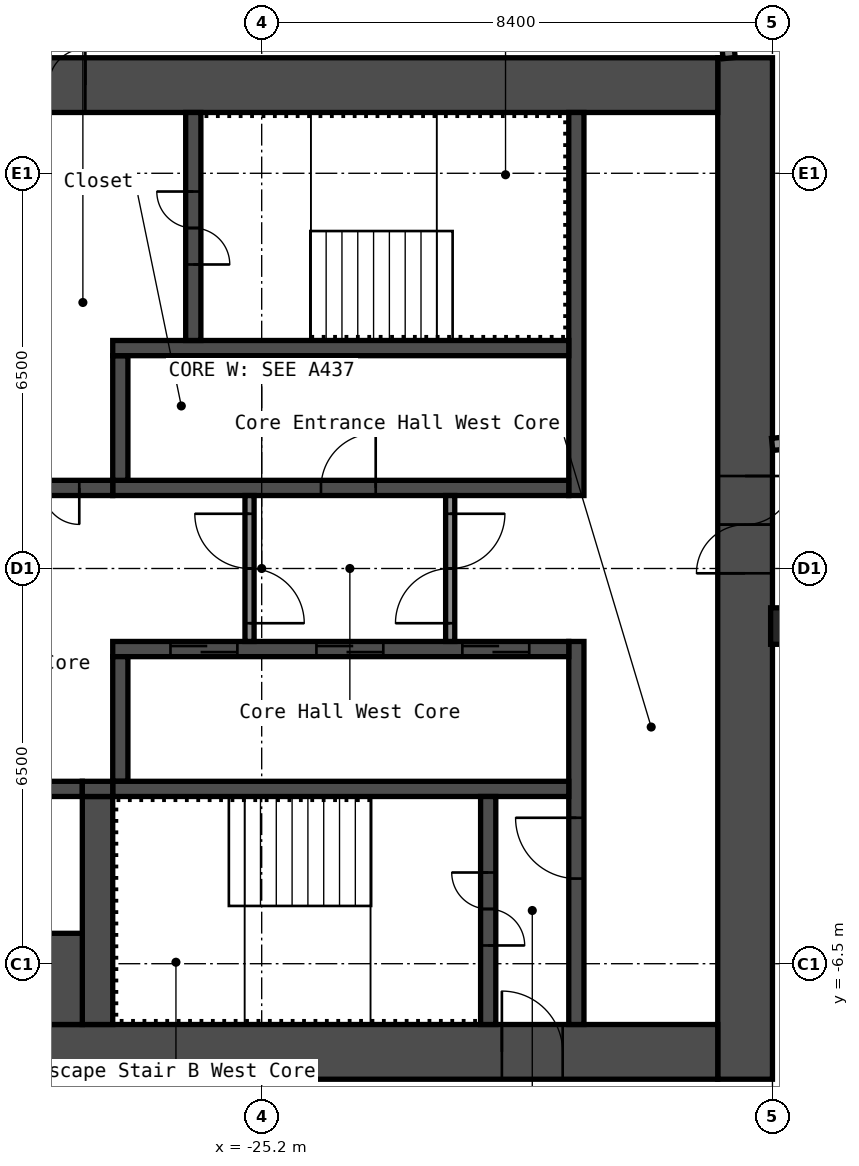
"""IFC4 building model, lengths in metres.
Left out: names, types, materials, properties, quantities, classifications, styles, units other than length and angle.
Written with IfcOpenShell. Run it as: python <this file> out.ifc"""

import sys

from ifc_helpers import new_model, si_unit, direction, frame, frame_2d, origin, origin_2d, place, context, subcontext, project, spatial, rectangle, hollow_rectangle, extrude, element, fill, save


model = new_model("IFC4")
c1 = context("Model", 3, precision=1e-05, world=origin(), true_north=direction((0.0, 1.0)))
c2 = subcontext(c1, "Body", "Model", "MODEL_VIEW")
j1 = project(units=[si_unit("LENGTHUNIT", "METRE"), si_unit("PLANEANGLEUNIT", "RADIAN")], contexts=[c1])
p1 = place(None, origin())
s1 = spatial("IfcSite", under=j1, at=p1, CompositionType="ELEMENT")
p2 = place(p1, origin())
s2 = spatial("IfcBuilding", under=s1, at=p2, CompositionType="ELEMENT")
p3 = place(p2, frame((0.0, 0.0, 261.4)))
s3 = spatial("IfcBuildingStorey", under=s2, at=p3, CompositionType="ELEMENT", Elevation=261.4)
p4 = place(p3, frame((-16.53, -0.947, 0.0), z_axis=(0.0, 0.0, 1.0), x_axis=(1.0, 0.0, 0.0)))
e1 = element("IfcColumn", 1, at=p4, inside=s3, PredefinedType="COLUMN", context=c2, shape_type="SweptSolid", body=[
    extrude(hollow_rectangle(XDim=0.6, YDim=0.6, WallThickness=0.025, InnerFilletRadius=0.038, OuterFilletRadius=0.062, at=origin_2d()), origin(), (0.0, 0.0, 1.0), 2.75),
])
p5 = place(p3, frame((-17.25, -8.4, 0.0), z_axis=(0.0, 0.0, 1.0), x_axis=(0.0, 1.0, 0.0)))
e2 = element("IfcWall", 2, at=p5, inside=s3, PredefinedType="SHEAR", context=c2, shape_type="SweptSolid", body=[
    extrude(rectangle(XDim=16.8, YDim=0.9, at=frame_2d((8.4, 0.0))), origin(), (0.0, 0.0, 1.0), 2.75),
])
p6 = place(p5, frame((8.321, 0.0, 0.0)))
e3 = element("IfcOpeningElement", 3, at=p6, cuts=e2, PredefinedType="OPENING", context=c2, shape_type="SweptSolid", body=[
    extrude(rectangle(XDim=1.6, YDim=2.1, at=frame_2d((0.8, 1.05))), frame((0.0, 0.46, 0.0), z_axis=(0.0, -1.0, 0.0), x_axis=(1.0, 0.0, 0.0)), (0.0, 0.0, 1.0), 0.92),
])
p7 = place(p3, frame((-32.7, 7.95, 0.0), z_axis=(0.0, 0.0, 1.0), x_axis=(1.0, 0.0, 0.0)))
e4 = element("IfcWall", 4, at=p7, inside=s3, PredefinedType="SHEAR", context=c2, shape_type="SweptSolid", body=[
    extrude(rectangle(XDim=15.0, YDim=0.9, at=frame_2d((7.5, 0.0))), origin(), (0.0, 0.0, 1.0), 2.75),
])
p8 = place(p7, frame((3.4, 0.0, 0.0)))
e5 = element("IfcOpeningElement", 5, at=p8, cuts=e4, PredefinedType="OPENING", context=c2, shape_type="SweptSolid", body=[
    extrude(rectangle(XDim=1.2, YDim=2.1, at=frame_2d((0.6, 1.05))), frame((0.0, 0.46, 0.0), z_axis=(0.0, -1.0, 0.0), x_axis=(1.0, 0.0, 0.0)), (0.0, 0.0, 1.0), 0.92),
])
p9 = place(p7, frame((0.75, 0.0, 0.0)))
e6 = element("IfcOpeningElement", 6, at=p9, cuts=e4, PredefinedType="OPENING", context=c2, shape_type="SweptSolid", body=[
    extrude(rectangle(XDim=0.9, YDim=2.1, at=frame_2d((0.45, 1.05))), frame((0.0, 0.46, 0.0), z_axis=(0.0, -1.0, 0.0), x_axis=(1.0, 0.0, 0.0)), (0.0, 0.0, 1.0), 0.92),
])
p10 = place(p3, frame((-32.7, -7.95, 0.0), z_axis=(0.0, 0.0, 1.0), x_axis=(1.0, 0.0, 0.0)))
e7 = element("IfcWall", 7, at=p10, inside=s3, PredefinedType="SHEAR", context=c2, shape_type="SweptSolid", body=[
    extrude(rectangle(XDim=15.0, YDim=0.9, at=frame_2d((7.5, 0.0))), origin(), (0.0, 0.0, 1.0), 2.75),
])
p11 = place(p10, frame((11.45, 0.0, 0.0)))
e8 = element("IfcOpeningElement", 8, at=p11, cuts=e7, PredefinedType="OPENING", context=c2, shape_type="SweptSolid", body=[
    extrude(rectangle(XDim=1.0, YDim=2.1, at=frame_2d((0.5, 1.05))), frame((0.0, 0.46, 0.0), z_axis=(0.0, -1.0, 0.0), x_axis=(1.0, 0.0, 0.0)), (0.0, 0.0, 1.0), 0.92),
])
p12 = place(p3, frame((-20.025, 1.2, 0.0), z_axis=(0.0, 0.0, 1.0), x_axis=(0.0, 1.0, 0.0)))
e9 = element("IfcWall", 9, at=p12, inside=s3, PredefinedType="SHEAR", context=c2, shape_type="SweptSolid", body=[
    extrude(rectangle(XDim=6.3, YDim=0.25, at=frame_2d((3.15, 0.0))), origin(), (0.0, 0.0, 1.0), 2.75),
])
p13 = place(p3, frame((-20.025, -7.5, 0.0), z_axis=(0.0, 0.0, 1.0), x_axis=(0.0, 1.0, 0.0)))
e10 = element("IfcWall", 10, at=p13, inside=s3, PredefinedType="SHEAR", context=c2, shape_type="SweptSolid", body=[
    extrude(rectangle(XDim=6.3, YDim=0.25, at=frame_2d((3.15, 0.0))), origin(), (0.0, 0.0, 1.0), 2.75),
])
p14 = place(p13, frame((2.4, 0.0, 0.0)))
e11 = element("IfcOpeningElement", 11, at=p14, cuts=e10, PredefinedType="OPENING", context=c2, shape_type="SweptSolid", body=[
    extrude(rectangle(XDim=1.0, YDim=2.1, at=frame_2d((0.5, 1.05))), frame((0.0, 0.135, 0.0), z_axis=(0.0, -1.0, 0.0), x_axis=(1.0, 0.0, 0.0)), (0.0, 0.0, 1.0), 0.27),
])
p15 = place(p3, frame((-27.65, 1.325, 0.0), z_axis=(0.0, 0.0, 1.0), x_axis=(1.0, 0.0, 0.0)))
e12 = element("IfcWall", 12, at=p15, inside=s3, PredefinedType="SHEAR", context=c2, shape_type="SweptSolid", body=[
    extrude(rectangle(XDim=7.5, YDim=0.25, at=frame_2d((3.75, 0.0))), origin(), (0.0, 0.0, 1.0), 2.75),
])
p16 = place(p15, frame((3.425, 0.0, 0.0)))
e13 = element("IfcOpeningElement", 13, at=p16, cuts=e12, PredefinedType="OPENING", context=c2, shape_type="SweptSolid", body=[
    extrude(rectangle(XDim=0.9, YDim=2.1, at=frame_2d((0.45, 1.05))), frame((0.0, 0.135, 0.0), z_axis=(0.0, -1.0, 0.0), x_axis=(1.0, 0.0, 0.0)), (0.0, 0.0, 1.0), 0.27),
])
p17 = place(p3, frame((-27.525, 1.45, 0.0), z_axis=(0.0, 0.0, 1.0), x_axis=(0.0, 1.0, 0.0)))
e14 = element("IfcWall", 14, at=p17, inside=s3, PredefinedType="SHEAR", context=c2, shape_type="SweptSolid", body=[
    extrude(rectangle(XDim=2.05, YDim=0.25, at=frame_2d((1.025, 0.0))), origin(), (0.0, 0.0, 1.0), 2.75),
])
p18 = place(p3, frame((-27.65, 3.625, 0.0), z_axis=(0.0, 0.0, 1.0), x_axis=(1.0, 0.0, 0.0)))
e15 = element("IfcWall", 15, at=p18, inside=s3, PredefinedType="SHEAR", context=c2, shape_type="SweptSolid", body=[
    extrude(rectangle(XDim=7.5, YDim=0.25, at=frame_2d((3.75, 0.0))), origin(), (0.0, 0.0, 1.0), 2.75),
])
p19 = place(p3, frame((-26.325, 3.75, 0.0), z_axis=(0.0, 0.0, 1.0), x_axis=(0.0, 1.0, 0.0)))
e16 = element("IfcWall", 16, at=p19, inside=s3, PredefinedType="SHEAR", context=c2, shape_type="SweptSolid", body=[
    extrude(rectangle(XDim=3.75, YDim=0.25, at=frame_2d((1.875, 0.0))), origin(), (0.0, 0.0, 1.0), 2.75),
])
p20 = place(p19, frame((1.25, 0.0, 0.0)))
e17 = element("IfcOpeningElement", 17, at=p20, cuts=e16, PredefinedType="OPENING", context=c2, shape_type="SweptSolid", body=[
    extrude(rectangle(XDim=1.2, YDim=2.1, at=frame_2d((0.6, 1.05))), frame((0.0, 0.135, 0.0), z_axis=(0.0, -1.0, 0.0), x_axis=(1.0, 0.0, 0.0)), (0.0, 0.0, 1.0), 0.27),
])
p21 = place(p3, frame((-32.7, 1.325, 0.0), z_axis=(0.0, 0.0, 1.0), x_axis=(1.0, 0.0, 0.0)))
e18 = element("IfcWall", 18, at=p21, inside=s3, PredefinedType="SHEAR", context=c2, shape_type="SweptSolid", body=[
    extrude(rectangle(XDim=5.05, YDim=0.25, at=frame_2d((2.525, 0.0))), origin(), (0.0, 0.0, 1.0), 2.75),
])
p22 = place(p21, frame((3.3, 0.0, 0.0)))
e19 = element("IfcOpeningElement", 19, at=p22, cuts=e18, PredefinedType="OPENING", context=c2, shape_type="SweptSolid", body=[
    extrude(rectangle(XDim=1.2, YDim=2.1, at=frame_2d((0.6, 1.05))), frame((0.0, 0.135, 0.0), z_axis=(0.0, -1.0, 0.0), x_axis=(1.0, 0.0, 0.0)), (0.0, 0.0, 1.0), 0.27),
])
p23 = place(p3, frame((-27.65, -1.325, 0.0), z_axis=(0.0, 0.0, 1.0), x_axis=(1.0, 0.0, 0.0)))
e20 = element("IfcWall", 20, at=p23, inside=s3, PredefinedType="SHEAR", context=c2, shape_type="SweptSolid", body=[
    extrude(rectangle(XDim=7.5, YDim=0.25, at=frame_2d((3.75, 0.0))), origin(), (0.0, 0.0, 1.0), 2.75),
])
p24 = place(p23, frame((5.75, 0.0, 0.0)))
e21 = element("IfcOpeningElement", 21, at=p24, cuts=e20, PredefinedType="OPENING", context=c2, shape_type="SweptSolid", body=[
    extrude(rectangle(XDim=1.1, YDim=2.1, at=frame_2d((0.55, 1.05))), frame((0.0, 0.135, 0.0), z_axis=(0.0, -1.0, 0.0), x_axis=(1.0, 0.0, 0.0)), (0.0, 0.0, 1.0), 0.27),
])
p25 = place(p23, frame((3.35, 0.0, 0.0)))
e22 = element("IfcOpeningElement", 22, at=p25, cuts=e20, PredefinedType="OPENING", context=c2, shape_type="SweptSolid", body=[
    extrude(rectangle(XDim=1.1, YDim=2.1, at=frame_2d((0.55, 1.05))), frame((0.0, 0.135, 0.0), z_axis=(0.0, -1.0, 0.0), x_axis=(1.0, 0.0, 0.0)), (0.0, 0.0, 1.0), 0.27),
])
p26 = place(p23, frame((0.95, 0.0, 0.0)))
e23 = element("IfcOpeningElement", 23, at=p26, cuts=e20, PredefinedType="OPENING", context=c2, shape_type="SweptSolid", body=[
    extrude(rectangle(XDim=1.1, YDim=2.1, at=frame_2d((0.55, 1.05))), frame((0.0, 0.135, 0.0), z_axis=(0.0, -1.0, 0.0), x_axis=(1.0, 0.0, 0.0)), (0.0, 0.0, 1.0), 0.27),
])
p27 = place(p3, frame((-27.525, -3.5, 0.0), z_axis=(0.0, 0.0, 1.0), x_axis=(0.0, 1.0, 0.0)))
e24 = element("IfcWall", 24, at=p27, inside=s3, PredefinedType="SHEAR", context=c2, shape_type="SweptSolid", body=[
    extrude(rectangle(XDim=2.05, YDim=0.25, at=frame_2d((1.025, 0.0))), origin(), (0.0, 0.0, 1.0), 2.75),
])
p28 = place(p3, frame((-27.65, -3.625, 0.0), z_axis=(0.0, 0.0, 1.0), x_axis=(1.0, 0.0, 0.0)))
e25 = element("IfcWall", 25, at=p28, inside=s3, PredefinedType="SHEAR", context=c2, shape_type="SweptSolid", body=[
    extrude(rectangle(XDim=7.5, YDim=0.25, at=frame_2d((3.75, 0.0))), origin(), (0.0, 0.0, 1.0), 2.75),
])
p29 = place(p3, frame((-21.475, -7.5, 0.0), z_axis=(0.0, 0.0, 1.0), x_axis=(0.0, 1.0, 0.0)))
e26 = element("IfcWall", 26, at=p29, inside=s3, PredefinedType="SHEAR", context=c2, shape_type="SweptSolid", body=[
    extrude(rectangle(XDim=3.75, YDim=0.25, at=frame_2d((1.875, 0.0))), origin(), (0.0, 0.0, 1.0), 2.75),
])
p30 = place(p29, frame((1.3, 0.0, 0.0)))
e27 = element("IfcOpeningElement", 27, at=p30, cuts=e26, PredefinedType="OPENING", context=c2, shape_type="SweptSolid", body=[
    extrude(rectangle(XDim=1.2, YDim=2.1, at=frame_2d((0.6, 1.05))), frame((0.0, 0.135, 0.0), z_axis=(0.0, -1.0, 0.0), x_axis=(1.0, 0.0, 0.0)), (0.0, 0.0, 1.0), 0.27),
])
p31 = place(p3, frame((-27.9, -7.5, 0.0), z_axis=(0.0, 0.0, 1.0), x_axis=(0.0, 1.0, 0.0)))
e28 = element("IfcWall", 28, at=p31, inside=s3, PredefinedType="SHEAR", context=c2, shape_type="SweptSolid", body=[
    extrude(rectangle(XDim=3.75, YDim=0.5, at=frame_2d((1.875, 0.0))), origin(), (0.0, 0.0, 1.0), 2.75),
])
p32 = place(p3, frame((-32.7, -3.625, 0.0), z_axis=(0.0, 0.0, 1.0), x_axis=(1.0, 0.0, 0.0)))
e29 = element("IfcWall", 29, at=p32, inside=s3, PredefinedType="SHEAR", context=c2, shape_type="SweptSolid", body=[
    extrude(rectangle(XDim=4.55, YDim=0.25, at=frame_2d((2.275, 0.0))), origin(), (0.0, 0.0, 1.0), 2.75),
])
p33 = place(p32, frame((2.85, 0.0, 0.0)))
e30 = element("IfcOpeningElement", 30, at=p33, cuts=e29, PredefinedType="OPENING", context=c2, shape_type="SweptSolid", body=[
    extrude(rectangle(XDim=1.1, YDim=2.1, at=frame_2d((0.55, 1.05))), frame((0.0, 0.135, 0.0), z_axis=(0.0, -1.0, 0.0), x_axis=(1.0, 0.0, 0.0)), (0.0, 0.0, 1.0), 0.27),
])
p34 = place(p32, frame((0.6, 0.0, 0.0)))
e31 = element("IfcOpeningElement", 31, at=p34, cuts=e29, PredefinedType="OPENING", context=c2, shape_type="SweptSolid", body=[
    extrude(rectangle(XDim=1.1, YDim=2.1, at=frame_2d((0.55, 1.05))), frame((0.0, 0.135, 0.0), z_axis=(0.0, -1.0, 0.0), x_axis=(1.0, 0.0, 0.0)), (0.0, 0.0, 1.0), 0.27),
])
p35 = place(p3, frame((-32.7, -6.75, 0.0), z_axis=(0.0, 0.0, 1.0), x_axis=(1.0, 0.0, 0.0)))
e32 = element("IfcWall", 32, at=p35, inside=s3, PredefinedType="SHEAR", context=c2, shape_type="SweptSolid", body=[
    extrude(rectangle(XDim=4.55, YDim=1.5, at=frame_2d((2.275, 0.0))), origin(), (0.0, 0.0, 1.0), 2.75),
])
p36 = place(p3, frame((-28.15, -3.625, 0.0), z_axis=(0.0, 0.0, 1.0), x_axis=(1.0, 0.0, 0.0)))
e33 = element("IfcWall", 33, at=p36, inside=s3, PredefinedType="SHEAR", context=c2, shape_type="SweptSolid", body=[
    extrude(rectangle(XDim=0.5, YDim=0.25, at=frame_2d((0.25, 0.0))), origin(), (0.0, 0.0, 1.0), 2.75),
])
p37 = place(p3, frame((-22.1, -1.2, 0.0), z_axis=(0.0, 0.0, 1.0), x_axis=(0.0, 1.0, 0.0)))
e34 = element("IfcWall", 34, at=p37, inside=s3, PredefinedType="PARTITIONING", context=c2, shape_type="SweptSolid", body=[
    extrude(rectangle(XDim=2.4, YDim=0.15, at=frame_2d((1.2, 0.0))), origin(), (0.0, 0.0, 1.0), 2.75),
])
p38 = place(p37, frame((0.3, 0.0, 0.0)))
e35 = element("IfcOpeningElement", 35, at=p38, cuts=e34, PredefinedType="OPENING", context=c2, shape_type="SweptSolid", body=[
    extrude(rectangle(XDim=1.8, YDim=2.1, at=frame_2d((0.9, 1.05))), frame((0.0, 0.085, 0.0), z_axis=(0.0, -1.0, 0.0), x_axis=(1.0, 0.0, 0.0)), (0.0, 0.0, 1.0), 0.17),
])
p39 = place(p3, frame((-25.4, -1.2, 0.0), z_axis=(0.0, 0.0, 1.0), x_axis=(0.0, 1.0, 0.0)))
e36 = element("IfcWall", 36, at=p39, inside=s3, PredefinedType="PARTITIONING", context=c2, shape_type="SweptSolid", body=[
    extrude(rectangle(XDim=2.4, YDim=0.15, at=frame_2d((1.2, 0.0))), origin(), (0.0, 0.0, 1.0), 2.75),
])
p40 = place(p39, frame((0.3, 0.0, 0.0)))
e37 = element("IfcOpeningElement", 37, at=p40, cuts=e36, PredefinedType="OPENING", context=c2, shape_type="SweptSolid", body=[
    extrude(rectangle(XDim=1.8, YDim=2.1, at=frame_2d((0.9, 1.05))), frame((0.0, 0.085, 0.0), z_axis=(0.0, -1.0, 0.0), x_axis=(1.0, 0.0, 0.0)), (0.0, 0.0, 1.0), 0.17),
])
p41 = place(p3, frame((-16.805, 2.041, 0.0), z_axis=(0.0, 0.0, 1.0), x_axis=(0.994521146831, 0.104535584879, 0.0)))
e38 = element("IfcWall", 38, at=p41, inside=s3, PredefinedType="PARTITIONING", context=c2, shape_type="SweptSolid", body=[
    extrude(rectangle(XDim=33.561, YDim=0.2, at=frame_2d((16.78, 0.0))), origin(), (0.0, 0.0, 1.0), 2.75),
])
p42 = place(p41, frame((1.861, 0.0, 0.0)))
e39 = element("IfcOpeningElement", 39, at=p42, cuts=e38, PredefinedType="OPENING", context=c2, shape_type="SweptSolid", body=[
    extrude(rectangle(XDim=0.9, YDim=2.1, at=frame_2d((0.45, 1.05))), frame((0.0, 0.11, 0.0), z_axis=(0.0, -1.0, 0.0), x_axis=(1.0, 0.0, 0.0)), (0.0, 0.0, 1.0), 0.22),
])
p43 = place(p41, frame((6.061, 0.0, 0.0)))
e40 = element("IfcOpeningElement", 40, at=p43, cuts=e38, PredefinedType="OPENING", context=c2, shape_type="SweptSolid", body=[
    extrude(rectangle(XDim=0.9, YDim=2.1, at=frame_2d((0.45, 1.05))), frame((0.0, 0.11, 0.0), z_axis=(0.0, -1.0, 0.0), x_axis=(1.0, 0.0, 0.0)), (0.0, 0.0, 1.0), 0.22),
])
p44 = place(p41, frame((13.761, 0.0, 0.0)))
e41 = element("IfcOpeningElement", 41, at=p44, cuts=e38, PredefinedType="OPENING", context=c2, shape_type="SweptSolid", body=[
    extrude(rectangle(XDim=1.0, YDim=2.1, at=frame_2d((0.5, 1.05))), frame((0.0, 0.11, 0.0), z_axis=(0.0, -1.0, 0.0), x_axis=(1.0, 0.0, 0.0)), (0.0, 0.0, 1.0), 0.22),
])
p45 = place(p41, frame((19.611, 0.0, 0.0)))
e42 = element("IfcOpeningElement", 42, at=p45, cuts=e38, PredefinedType="OPENING", context=c2, shape_type="SweptSolid", body=[
    extrude(rectangle(XDim=1.0, YDim=2.1, at=frame_2d((0.5, 1.05))), frame((0.0, 0.11, 0.0), z_axis=(0.0, -1.0, 0.0), x_axis=(1.0, 0.0, 0.0)), (0.0, 0.0, 1.0), 0.22),
])
p46 = place(p41, frame((21.311, 0.0, 0.0)))
e43 = element("IfcOpeningElement", 43, at=p46, cuts=e38, PredefinedType="OPENING", context=c2, shape_type="SweptSolid", body=[
    extrude(rectangle(XDim=1.0, YDim=2.1, at=frame_2d((0.5, 1.05))), frame((0.0, 0.11, 0.0), z_axis=(0.0, -1.0, 0.0), x_axis=(1.0, 0.0, 0.0)), (0.0, 0.0, 1.0), 0.22),
])
p47 = place(p41, frame((27.231, 0.0, 0.0)))
e44 = element("IfcOpeningElement", 44, at=p47, cuts=e38, PredefinedType="OPENING", context=c2, shape_type="SweptSolid", body=[
    extrude(rectangle(XDim=0.9, YDim=2.1, at=frame_2d((0.45, 1.05))), frame((0.0, 0.11, 0.0), z_axis=(0.0, -1.0, 0.0), x_axis=(1.0, 0.0, 0.0)), (0.0, 0.0, 1.0), 0.22),
])
p48 = place(p41, frame((31.431, 0.0, 0.0)))
e45 = element("IfcOpeningElement", 45, at=p48, cuts=e38, PredefinedType="OPENING", context=c2, shape_type="SweptSolid", body=[
    extrude(rectangle(XDim=0.9, YDim=2.1, at=frame_2d((0.45, 1.05))), frame((0.0, 0.11, 0.0), z_axis=(0.0, -1.0, 0.0), x_axis=(1.0, 0.0, 0.0)), (0.0, 0.0, 1.0), 0.22),
])
p49 = place(p3, frame((-17.512, 8.395, 0.0), z_axis=(0.0, 0.0, 1.0), x_axis=(-0.104524714473, 0.994522289375, 0.0)))
e46 = element("IfcWall", 46, at=p49, inside=s3, PredefinedType="PARTITIONING", context=c2, shape_type="SweptSolid", body=[
    extrude(rectangle(XDim=9.607, YDim=0.2, at=frame_2d((4.803, 0.0))), origin(), (0.0, 0.0, 1.0), 2.75),
])
p50 = place(p6, origin())
e47 = element("IfcDoor", 47, at=p50, inside=s3, OperationType="DOUBLE_DOOR_SINGLE_SWING", PredefinedType="DOOR", context=c2, shape_type="SweptSolid", body=[
    extrude(rectangle(XDim=1.6, YDim=2.1, at=frame_2d((0.8, 1.05))), frame((0.0, 0.025, 0.0), z_axis=(0.0, -1.0, 0.0), x_axis=(1.0, 0.0, 0.0)), (0.0, 0.0, 1.0), 0.05),
])
fill(e3, e47)
p51 = place(p8, origin())
e48 = element("IfcDoor", 48, at=p51, inside=s3, OperationType="DOUBLE_DOOR_SINGLE_SWING", PredefinedType="DOOR", context=c2, shape_type="SweptSolid", body=[
    extrude(rectangle(XDim=1.2, YDim=2.1, at=frame_2d((0.6, 1.05))), frame((0.0, 0.025, 0.0), z_axis=(0.0, -1.0, 0.0), x_axis=(1.0, 0.0, 0.0)), (0.0, 0.0, 1.0), 0.05),
])
fill(e5, e48)
p52 = place(p11, origin())
e49 = element("IfcDoor", 49, at=p52, inside=s3, OperationType="SINGLE_SWING_RIGHT", PredefinedType="DOOR", context=c2, shape_type="SweptSolid", body=[
    extrude(rectangle(XDim=1.0, YDim=2.1, at=frame_2d((0.5, 1.05))), frame((0.0, 0.025, 0.0), z_axis=(0.0, -1.0, 0.0), x_axis=(1.0, 0.0, 0.0)), (0.0, 0.0, 1.0), 0.05),
])
fill(e8, e49)
p53 = place(p20, origin())
e50 = element("IfcDoor", 50, at=p53, inside=s3, OperationType="DOUBLE_DOOR_SINGLE_SWING", PredefinedType="DOOR", context=c2, shape_type="SweptSolid", body=[
    extrude(rectangle(XDim=1.2, YDim=2.1, at=frame_2d((0.6, 1.05))), frame((0.0, 0.025, 0.0), z_axis=(0.0, -1.0, 0.0), x_axis=(1.0, 0.0, 0.0)), (0.0, 0.0, 1.0), 0.05),
])
fill(e17, e50)
p54 = place(p30, origin())
e51 = element("IfcDoor", 51, at=p54, inside=s3, OperationType="DOUBLE_DOOR_SINGLE_SWING", PredefinedType="DOOR", context=c2, shape_type="SweptSolid", body=[
    extrude(rectangle(XDim=1.2, YDim=2.1, at=frame_2d((0.6, 1.05))), frame((0.0, 0.025, 0.0), z_axis=(0.0, -1.0, 0.0), x_axis=(1.0, 0.0, 0.0)), (0.0, 0.0, 1.0), 0.05),
])
fill(e27, e51)
p55 = place(p14, origin())
e52 = element("IfcDoor", 52, at=p55, inside=s3, OperationType="SINGLE_SWING_LEFT", PredefinedType="DOOR", context=c2, shape_type="SweptSolid", body=[
    extrude(rectangle(XDim=1.0, YDim=2.1, at=frame_2d((0.5, 1.05))), frame((0.0, 0.025, 0.0), z_axis=(0.0, -1.0, 0.0), x_axis=(1.0, 0.0, 0.0)), (0.0, 0.0, 1.0), 0.05),
])
fill(e11, e52)
p56 = place(p22, origin())
e53 = element("IfcDoor", 53, at=p56, inside=s3, OperationType="DOUBLE_DOOR_SINGLE_SWING", PredefinedType="DOOR", context=c2, shape_type="SweptSolid", body=[
    extrude(rectangle(XDim=1.2, YDim=2.1, at=frame_2d((0.6, 1.05))), frame((0.0, 0.025, 0.0), z_axis=(0.0, -1.0, 0.0), x_axis=(1.0, 0.0, 0.0)), (0.0, 0.0, 1.0), 0.05),
])
fill(e19, e53)
p57 = place(p38, origin())
e54 = element("IfcDoor", 54, at=p57, inside=s3, OperationType="DOUBLE_DOOR_SINGLE_SWING", PredefinedType="DOOR", context=c2, shape_type="SweptSolid", body=[
    extrude(rectangle(XDim=1.8, YDim=2.1, at=frame_2d((0.9, 1.05))), frame((0.0, 0.025, 0.0), z_axis=(0.0, -1.0, 0.0), x_axis=(1.0, 0.0, 0.0)), (0.0, 0.0, 1.0), 0.05),
])
fill(e35, e54)
p58 = place(p40, origin())
e55 = element("IfcDoor", 55, at=p58, inside=s3, OperationType="DOUBLE_DOOR_SINGLE_SWING", PredefinedType="DOOR", context=c2, shape_type="SweptSolid", body=[
    extrude(rectangle(XDim=1.8, YDim=2.1, at=frame_2d((0.9, 1.05))), frame((0.0, 0.025, 0.0), z_axis=(0.0, -1.0, 0.0), x_axis=(1.0, 0.0, 0.0)), (0.0, 0.0, 1.0), 0.05),
])
fill(e37, e55)
p59 = place(p16, origin())
e56 = element("IfcDoor", 56, at=p59, inside=s3, OperationType="SINGLE_SWING_LEFT", PredefinedType="DOOR", context=c2, shape_type="SweptSolid", body=[
    extrude(rectangle(XDim=0.9, YDim=2.1, at=frame_2d((0.45, 1.05))), frame((0.0, 0.025, 0.0), z_axis=(0.0, -1.0, 0.0), x_axis=(1.0, 0.0, 0.0)), (0.0, 0.0, 1.0), 0.05),
])
fill(e13, e56)
p60 = place(p24, origin())
e57 = element("IfcDoor", 57, at=p60, inside=s3, OperationType="DOUBLE_DOOR_SLIDING", PredefinedType="DOOR", context=c2, shape_type="SweptSolid", body=[
    extrude(rectangle(XDim=1.1, YDim=2.1, at=frame_2d((0.55, 1.05))), frame((0.0, 0.025, 0.0), z_axis=(0.0, -1.0, 0.0), x_axis=(1.0, 0.0, 0.0)), (0.0, 0.0, 1.0), 0.05),
])
fill(e21, e57)
p61 = place(p25, origin())
e58 = element("IfcDoor", 58, at=p61, inside=s3, OperationType="DOUBLE_DOOR_SLIDING", PredefinedType="DOOR", context=c2, shape_type="SweptSolid", body=[
    extrude(rectangle(XDim=1.1, YDim=2.1, at=frame_2d((0.55, 1.05))), frame((0.0, 0.025, 0.0), z_axis=(0.0, -1.0, 0.0), x_axis=(1.0, 0.0, 0.0)), (0.0, 0.0, 1.0), 0.05),
])
fill(e22, e58)
p62 = place(p26, origin())
e59 = element("IfcDoor", 59, at=p62, inside=s3, OperationType="DOUBLE_DOOR_SLIDING", PredefinedType="DOOR", context=c2, shape_type="SweptSolid", body=[
    extrude(rectangle(XDim=1.1, YDim=2.1, at=frame_2d((0.55, 1.05))), frame((0.0, 0.025, 0.0), z_axis=(0.0, -1.0, 0.0), x_axis=(1.0, 0.0, 0.0)), (0.0, 0.0, 1.0), 0.05),
])
fill(e23, e59)
save(model, sys.argv[1])
